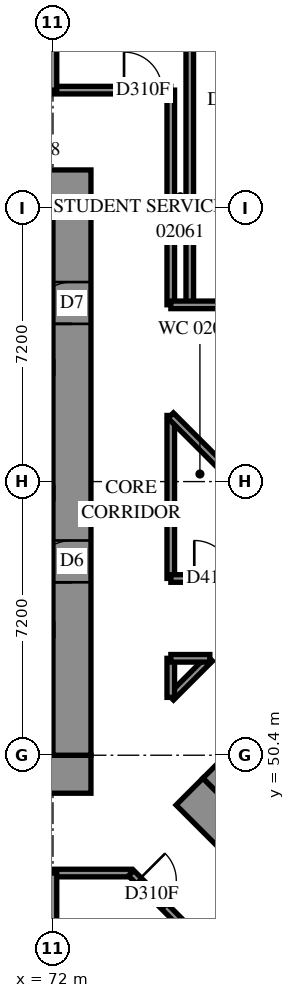
"""IFC4 building model, lengths in metres.
Left out: names, types, materials, properties, quantities, classifications, styles, units other than length and angle.
Written with IfcOpenShell. Run it as: python <this file> out.ifc"""

import sys

from ifc_helpers import new_model, si_unit, direction, frame, frame_2d, origin, place, context, subcontext, project, spatial, rectangle, extrude, element, fill, save


model = new_model("IFC4")
c1 = context("Model", 3, precision=1e-05, world=origin(), true_north=direction((0.0, 1.0)))
c2 = subcontext(c1, "Body", "Model", "MODEL_VIEW")
j1 = project(units=[si_unit("LENGTHUNIT", "METRE"), si_unit("PLANEANGLEUNIT", "RADIAN")], contexts=[c1])
p1 = place(None, origin())
s1 = spatial("IfcSite", under=j1, at=p1, CompositionType="ELEMENT")
p2 = place(p1, origin())
s2 = spatial("IfcBuilding", under=s1, at=p2, CompositionType="ELEMENT")
p3 = place(p2, frame((0.0, 0.0, 10.2)))
s3 = spatial("IfcBuildingStorey", under=s2, at=p3, CompositionType="ELEMENT", Elevation=10.2)
p4 = place(p3, frame((56.6, 49.9, -0.4), z_axis=(0.0, 0.0, 1.0), x_axis=(1.0, 0.0, 0.0)))
e1 = element("IfcWall", 1, at=p4, inside=s3, PredefinedType="SHEAR", context=c2, shape_type="SweptSolid", body=[
    extrude(rectangle(XDim=16.4, YDim=1.0, at=frame_2d((8.2, 0.0))), origin(), (0.0, 0.0, 1.0), 3.5),
])
p5 = place(p3, frame((56.6, 65.3, -0.4), z_axis=(0.0, 0.0, 1.0), x_axis=(1.0, 0.0, 0.0)))
e2 = element("IfcWall", 2, at=p5, inside=s3, PredefinedType="SHEAR", context=c2, shape_type="SweptSolid", body=[
    extrude(rectangle(XDim=16.4, YDim=1.0, at=frame_2d((8.2, 0.0))), origin(), (0.0, 0.0, 1.0), 3.5),
])
p6 = place(p5, frame((11.0, 0.0, 0.4)))
e3 = element("IfcOpeningElement", 3, at=p6, cuts=e2, PredefinedType="OPENING", context=c2, shape_type="SweptSolid", body=[
    extrude(rectangle(XDim=0.8, YDim=2.1, at=frame_2d((0.4, 1.05))), frame((0.0, 0.51, 0.0), z_axis=(0.0, -1.0, 0.0), x_axis=(1.0, 0.0, 0.0)), (0.0, 0.0, 1.0), 1.02),
])
p7 = place(p3, frame((72.5, 50.4, -0.4), z_axis=(0.0, 0.0, 1.0), x_axis=(0.0, 1.0, 0.0)))
e4 = element("IfcWall", 4, at=p7, inside=s3, PredefinedType="SHEAR", context=c2, shape_type="SweptSolid", body=[
    extrude(rectangle(XDim=14.4, YDim=1.0, at=frame_2d((7.2, 0.0))), origin(), (0.0, 0.0, 1.0), 3.5),
])
p8 = place(p7, frame((4.55, 0.0, 0.4)))
e5 = element("IfcOpeningElement", 5, at=p8, cuts=e4, PredefinedType="OPENING", context=c2, shape_type="SweptSolid", body=[
    extrude(rectangle(XDim=1.1, YDim=2.1, at=frame_2d((0.55, 1.05))), frame((0.0, 0.51, 0.0), z_axis=(0.0, -1.0, 0.0), x_axis=(1.0, 0.0, 0.0)), (0.0, 0.0, 1.0), 1.02),
])
p9 = place(p7, frame((11.35, 0.0, 0.4)))
e6 = element("IfcOpeningElement", 6, at=p9, cuts=e4, PredefinedType="OPENING", context=c2, shape_type="SweptSolid", body=[
    extrude(rectangle(XDim=1.1, YDim=2.1, at=frame_2d((0.55, 1.05))), frame((0.0, 0.51, 0.0), z_axis=(0.0, -1.0, 0.0), x_axis=(1.0, 0.0, 0.0)), (0.0, 0.0, 1.0), 1.02),
])
p10 = place(p3, frame((75.594, 49.443, -0.4), z_axis=(0.0, 0.0, 1.0), x_axis=(0.7071037324, -0.70710983, 0.0)))
e7 = element("IfcWall", 7, at=p10, inside=s3, PredefinedType="SHEAR", context=c2, shape_type="SweptSolid", body=[
    extrude(rectangle(XDim=16.4, YDim=1.0, at=frame_2d((8.2, 0.0))), origin(), (0.0, 0.0, 1.0), 3.5),
])
p11 = place(p3, frame((76.301, 49.443, -0.4), z_axis=(0.0, 0.0, 1.0), x_axis=(0.7071067812, 0.7071067812, 0.0)))
e8 = element("IfcWall", 8, at=p11, inside=s3, PredefinedType="SHEAR", context=c2, shape_type="SweptSolid", body=[
    extrude(rectangle(XDim=14.4, YDim=1.0, at=frame_2d((7.2, 0.0))), origin(), (0.0, 0.0, 1.0), 3.5),
])
p12 = place(p11, frame((4.55, 0.0, 0.4)))
e9 = element("IfcOpeningElement", 9, at=p12, cuts=e8, PredefinedType="OPENING", context=c2, shape_type="SweptSolid", body=[
    extrude(rectangle(XDim=1.1, YDim=2.1, at=frame_2d((0.55, 1.05))), frame((0.0, 0.51, 0.0), z_axis=(0.0, -1.0, 0.0), x_axis=(1.0, 0.0, 0.0)), (0.0, 0.0, 1.0), 1.02),
])
p13 = place(p11, frame((11.35, 0.0, 0.4)))
e10 = element("IfcOpeningElement", 10, at=p13, cuts=e8, PredefinedType="OPENING", context=c2, shape_type="SweptSolid", body=[
    extrude(rectangle(XDim=1.1, YDim=2.1, at=frame_2d((0.55, 1.05))), frame((0.0, 0.51, 0.0), z_axis=(0.0, -1.0, 0.0), x_axis=(1.0, 0.0, 0.0)), (0.0, 0.0, 1.0), 1.02),
])
p14 = place(p3, frame((54.5, 67.9, 0.0), z_axis=(0.0, 0.0, 1.0), x_axis=(1.0, 0.0, 0.0)))
e11 = element("IfcWall", 11, at=p14, inside=s3, PredefinedType="PARTITIONING", context=c2, shape_type="SweptSolid", body=[
    extrude(rectangle(XDim=20.6, YDim=0.2, at=frame_2d((10.3, 0.0))), origin(), (0.0, 0.0, 1.0), 3.8),
])
p15 = place(p14, frame((0.23, 0.0, 0.0)))
e12 = element("IfcOpeningElement", 12, at=p15, cuts=e11, PredefinedType="OPENING", context=c2, shape_type="SweptSolid", body=[
    extrude(rectangle(XDim=1.0, YDim=2.1, at=frame_2d((0.5, 1.05))), frame((0.0, 0.11, 0.0), z_axis=(0.0, -1.0, 0.0), x_axis=(1.0, 0.0, 0.0)), (0.0, 0.0, 1.0), 0.22),
])
p16 = place(p14, frame((19.37, 0.0, 0.0)))
e13 = element("IfcOpeningElement", 13, at=p16, cuts=e11, PredefinedType="OPENING", context=c2, shape_type="SweptSolid", body=[
    extrude(rectangle(XDim=1.0, YDim=2.1, at=frame_2d((0.5, 1.05))), frame((0.0, 0.11, 0.0), z_axis=(0.0, -1.0, 0.0), x_axis=(1.0, 0.0, 0.0)), (0.0, 0.0, 1.0), 0.22),
])
p17 = place(p14, frame((6.657, 0.0, 0.0)))
e14 = element("IfcOpeningElement", 14, at=p17, cuts=e11, PredefinedType="OPENING", context=c2, shape_type="SweptSolid", body=[
    extrude(rectangle(XDim=1.0, YDim=2.1, at=frame_2d((0.5, 1.05))), frame((0.0, 0.11, 0.0), z_axis=(0.0, -1.0, 0.0), x_axis=(1.0, 0.0, 0.0)), (0.0, 0.0, 1.0), 0.22),
])
p18 = place(p14, frame((13.857, 0.0, 0.0)))
e15 = element("IfcOpeningElement", 15, at=p18, cuts=e11, PredefinedType="OPENING", context=c2, shape_type="SweptSolid", body=[
    extrude(rectangle(XDim=1.0, YDim=2.1, at=frame_2d((0.5, 1.05))), frame((0.0, 0.11, 0.0), z_axis=(0.0, -1.0, 0.0), x_axis=(1.0, 0.0, 0.0)), (0.0, 0.0, 1.0), 0.22),
])
p19 = place(p3, frame((54.5, 47.3, 0.0), z_axis=(0.0, 0.0, 1.0), x_axis=(1.0, 0.0, 0.0)))
e16 = element("IfcWall", 16, at=p19, inside=s3, PredefinedType="PARTITIONING", context=c2, shape_type="SweptSolid", body=[
    extrude(rectangle(XDim=19.56, YDim=0.2, at=frame_2d((9.78, 0.0))), origin(), (0.0, 0.0, 1.0), 3.8),
])
p20 = place(p19, frame((0.252, 0.0, 0.0)))
e17 = element("IfcOpeningElement", 17, at=p20, cuts=e16, PredefinedType="OPENING", context=c2, shape_type="SweptSolid", body=[
    extrude(rectangle(XDim=1.0, YDim=2.1, at=frame_2d((0.5, 1.05))), frame((0.0, 0.11, 0.0), z_axis=(0.0, -1.0, 0.0), x_axis=(1.0, 0.0, 0.0)), (0.0, 0.0, 1.0), 0.22),
])
p21 = place(p19, frame((4.865, 0.0, 0.0)))
e18 = element("IfcOpeningElement", 18, at=p21, cuts=e16, PredefinedType="OPENING", context=c2, shape_type="SweptSolid", body=[
    extrude(rectangle(XDim=1.0, YDim=2.1, at=frame_2d((0.5, 1.05))), frame((0.0, 0.11, 0.0), z_axis=(0.0, -1.0, 0.0), x_axis=(1.0, 0.0, 0.0)), (0.0, 0.0, 1.0), 0.22),
])
p22 = place(p19, frame((7.225, 0.0, 0.0)))
e19 = element("IfcOpeningElement", 19, at=p22, cuts=e16, PredefinedType="OPENING", context=c2, shape_type="SweptSolid", body=[
    extrude(rectangle(XDim=1.0, YDim=2.1, at=frame_2d((0.5, 1.05))), frame((0.0, 0.11, 0.0), z_axis=(0.0, -1.0, 0.0), x_axis=(1.0, 0.0, 0.0)), (0.0, 0.0, 1.0), 0.22),
])
p23 = place(p19, frame((12.065, 0.0, 0.0)))
e20 = element("IfcOpeningElement", 20, at=p23, cuts=e16, PredefinedType="OPENING", context=c2, shape_type="SweptSolid", body=[
    extrude(rectangle(XDim=1.0, YDim=2.1, at=frame_2d((0.5, 1.05))), frame((0.0, 0.11, 0.0), z_axis=(0.0, -1.0, 0.0), x_axis=(1.0, 0.0, 0.0)), (0.0, 0.0, 1.0), 0.22),
])
p24 = place(p19, frame((14.425, 0.0, 0.0)))
e21 = element("IfcOpeningElement", 21, at=p24, cuts=e16, PredefinedType="OPENING", context=c2, shape_type="SweptSolid", body=[
    extrude(rectangle(XDim=1.0, YDim=2.1, at=frame_2d((0.5, 1.05))), frame((0.0, 0.11, 0.0), z_axis=(0.0, -1.0, 0.0), x_axis=(1.0, 0.0, 0.0)), (0.0, 0.0, 1.0), 0.22),
])
p25 = place(p3, frame((75.6, 62.25, 0.0), z_axis=(0.0, 0.0, 1.0), x_axis=(0.0, 1.0, 0.0)))
e22 = element("IfcWall", 22, at=p25, inside=s3, PredefinedType="PARTITIONING", context=c2, shape_type="SweptSolid", body=[
    extrude(rectangle(XDim=10.4, YDim=0.2, at=frame_2d((5.2, 0.0))), origin(), (0.0, 0.0, 1.0), 3.8),
])
p26 = place(p3, frame((75.1, 62.252, 0.0), z_axis=(0.0, 0.0, 1.0), x_axis=(0.0, 1.0, 0.0)))
e23 = element("IfcWall", 23, at=p26, inside=s3, PredefinedType="PARTITIONING", context=c2, shape_type="SweptSolid", body=[
    extrude(rectangle(XDim=5.648, YDim=0.2, at=frame_2d((2.824, 0.0))), origin(), (0.0, 0.0, 1.0), 3.8),
])
p27 = place(p3, frame((74.057, 47.297, 0.0), z_axis=(0.0, 0.0, 1.0), x_axis=(0.7071067812, -0.7071067812, 0.0)))
e24 = element("IfcWall", 24, at=p27, inside=s3, PredefinedType="PARTITIONING", context=c2, shape_type="SweptSolid", body=[
    extrude(rectangle(XDim=4.653, YDim=0.2, at=frame_2d((2.326, 0.0))), origin(), (0.0, 0.0, 1.0), 3.8),
])
p28 = place(p27, frame((0.267, 0.0, 0.0)))
e25 = element("IfcOpeningElement", 25, at=p28, cuts=e24, PredefinedType="OPENING", context=c2, shape_type="SweptSolid", body=[
    extrude(rectangle(XDim=1.0, YDim=2.1, at=frame_2d((0.5, 1.05))), frame((0.0, 0.11, 0.0), z_axis=(0.0, -1.0, 0.0), x_axis=(1.0, 0.0, 0.0)), (0.0, 0.0, 1.0), 0.22),
])
p29 = place(p3, frame((75.1, 55.052, 0.0), z_axis=(0.0, 0.0, 1.0), x_axis=(0.0, 1.0, 0.0)))
e26 = element("IfcWall", 26, at=p29, inside=s3, PredefinedType="PARTITIONING", context=c2, shape_type="SweptSolid", body=[
    extrude(rectangle(XDim=4.288, YDim=0.2, at=frame_2d((2.144, 0.0))), origin(), (0.0, 0.0, 1.0), 3.8),
])
p30 = place(p3, frame((75.102, 62.25, 0.0), z_axis=(0.0, 0.0, 1.0), x_axis=(1.0, 0.0, 0.0)))
e27 = element("IfcWall", 27, at=p30, inside=s3, PredefinedType="PARTITIONING", context=c2, shape_type="SweptSolid", body=[
    extrude(rectangle(XDim=4.098, YDim=0.2, at=frame_2d((2.049, 0.0))), origin(), (0.0, 0.0, 1.0), 3.8),
])
p31 = place(p3, frame((72.0, 67.9, 0.0), z_axis=(0.0, 0.0, 1.0), x_axis=(0.0, 1.0, 0.0)))
e28 = element("IfcWall", 28, at=p31, inside=s3, PredefinedType="PARTITIONING", context=c2, shape_type="SweptSolid", body=[
    extrude(rectangle(XDim=3.5, YDim=0.2, at=frame_2d((1.75, 0.0))), origin(), (0.0, 0.0, 1.0), 3.8),
])
p32 = place(p3, frame((72.0, 43.906, 0.0), z_axis=(0.0, 0.0, 1.0), x_axis=(0.0, 1.0, 0.0)))
e29 = element("IfcWall", 29, at=p32, inside=s3, PredefinedType="PARTITIONING", context=c2, shape_type="SweptSolid", body=[
    extrude(rectangle(XDim=3.394, YDim=0.2, at=frame_2d((1.697, 0.0))), origin(), (0.0, 0.0, 1.0), 3.8),
])
p33 = place(p3, frame((75.099, 59.337, 0.0), z_axis=(0.0, 0.0, 1.0), x_axis=(0.7071067812, -0.7071067812, 0.0)))
e30 = element("IfcWall", 30, at=p33, inside=s3, PredefinedType="PARTITIONING", context=c2, shape_type="SweptSolid", body=[
    extrude(rectangle(XDim=3.179, YDim=0.2, at=frame_2d((1.59, 0.0))), origin(), (0.0, 0.0, 1.0), 3.8),
])
p34 = place(p3, frame((75.102, 55.05, 0.0), z_axis=(0.0, 0.0, 1.0), x_axis=(1.0, 0.0, 0.0)))
e31 = element("IfcWall", 31, at=p34, inside=s3, PredefinedType="PARTITIONING", context=c2, shape_type="SweptSolid", body=[
    extrude(rectangle(XDim=3.128, YDim=0.2, at=frame_2d((1.564, 0.0))), origin(), (0.0, 0.0, 1.0), 3.8),
])
p35 = place(p34, frame((0.617, 0.0, 0.0)))
e32 = element("IfcOpeningElement", 32, at=p35, cuts=e31, PredefinedType="OPENING", context=c2, shape_type="SweptSolid", body=[
    extrude(rectangle(XDim=1.0, YDim=2.1, at=frame_2d((0.5, 1.05))), frame((0.0, 0.11, 0.0), z_axis=(0.0, -1.0, 0.0), x_axis=(1.0, 0.0, 0.0)), (0.0, 0.0, 1.0), 0.22),
])
p36 = place(p3, frame((75.102, 51.922, 0.0), z_axis=(0.0, 0.0, 1.0), x_axis=(0.7071067812, 0.7071067812, 0.0)))
e33 = element("IfcWall", 33, at=p36, inside=s3, PredefinedType="PARTITIONING", context=c2, shape_type="SweptSolid", body=[
    extrude(rectangle(XDim=1.451, YDim=0.2, at=frame_2d((0.726, 0.0))), origin(), (0.0, 0.0, 1.0), 3.8),
])
p37 = place(p3, frame((75.1, 51.922, 0.0), z_axis=(0.0, 0.0, 1.0), x_axis=(0.0, 1.0, 0.0)))
e34 = element("IfcWall", 34, at=p37, inside=s3, PredefinedType="PARTITIONING", context=c2, shape_type="SweptSolid", body=[
    extrude(rectangle(XDim=1.028, YDim=0.2, at=frame_2d((0.514, 0.0))), origin(), (0.0, 0.0, 1.0), 3.8),
])
p38 = place(p3, frame((75.102, 52.95, 0.0), z_axis=(0.0, 0.0, 1.0), x_axis=(1.0, 0.0, 0.0)))
e35 = element("IfcWall", 35, at=p38, inside=s3, PredefinedType="PARTITIONING", context=c2, shape_type="SweptSolid", body=[
    extrude(rectangle(XDim=1.026, YDim=0.2, at=frame_2d((0.513, 0.0))), origin(), (0.0, 0.0, 1.0), 3.8),
])
p39 = place(p8, origin())
e36 = element("IfcDoor", 36, at=p39, inside=s3, OperationType="DOUBLE_DOOR_SINGLE_SWING", PredefinedType="DOOR", context=c2, shape_type="SweptSolid", body=[
    extrude(rectangle(XDim=1.1, YDim=2.1, at=frame_2d((0.55, 1.05))), frame((0.0, 0.025, 0.0), z_axis=(0.0, -1.0, 0.0), x_axis=(1.0, 0.0, 0.0)), (0.0, 0.0, 1.0), 0.05),
])
fill(e5, e36)
p40 = place(p9, origin())
e37 = element("IfcDoor", 37, at=p40, inside=s3, OperationType="SINGLE_SWING_RIGHT", PredefinedType="DOOR", context=c2, shape_type="SweptSolid", body=[
    extrude(rectangle(XDim=1.1, YDim=2.1, at=frame_2d((0.55, 1.05))), frame((0.0, 0.025, 0.0), z_axis=(0.0, -1.0, 0.0), x_axis=(1.0, 0.0, 0.0)), (0.0, 0.0, 1.0), 0.05),
])
fill(e6, e37)
p41 = place(p28, origin())
e38 = element("IfcDoor", 38, at=p41, inside=s3, OperationType="SINGLE_SWING_LEFT", PredefinedType="DOOR", context=c2, shape_type="SweptSolid", body=[
    extrude(rectangle(XDim=1.0, YDim=2.1, at=frame_2d((0.5, 1.05))), frame((0.0, 0.025, 0.0), z_axis=(0.0, -1.0, 0.0), x_axis=(1.0, 0.0, 0.0)), (0.0, 0.0, 1.0), 0.05),
])
fill(e25, e38)
p42 = place(p35, origin())
e39 = element("IfcDoor", 39, at=p42, inside=s3, OperationType="SINGLE_SWING_LEFT", PredefinedType="DOOR", context=c2, shape_type="SweptSolid", body=[
    extrude(rectangle(XDim=1.0, YDim=2.1, at=frame_2d((0.5, 1.05))), frame((0.0, 0.025, 0.0), z_axis=(0.0, -1.0, 0.0), x_axis=(1.0, 0.0, 0.0)), (0.0, 0.0, 1.0), 0.05),
])
fill(e32, e39)
p43 = place(p16, origin())
e40 = element("IfcDoor", 40, at=p43, inside=s3, OperationType="SINGLE_SWING_RIGHT", PredefinedType="DOOR", context=c2, shape_type="SweptSolid", body=[
    extrude(rectangle(XDim=1.0, YDim=2.1, at=frame_2d((0.5, 1.05))), frame((0.0, 0.025, 0.0), z_axis=(0.0, -1.0, 0.0), x_axis=(1.0, 0.0, 0.0)), (0.0, 0.0, 1.0), 0.05),
])
fill(e13, e40)
save(model, sys.argv[1])
